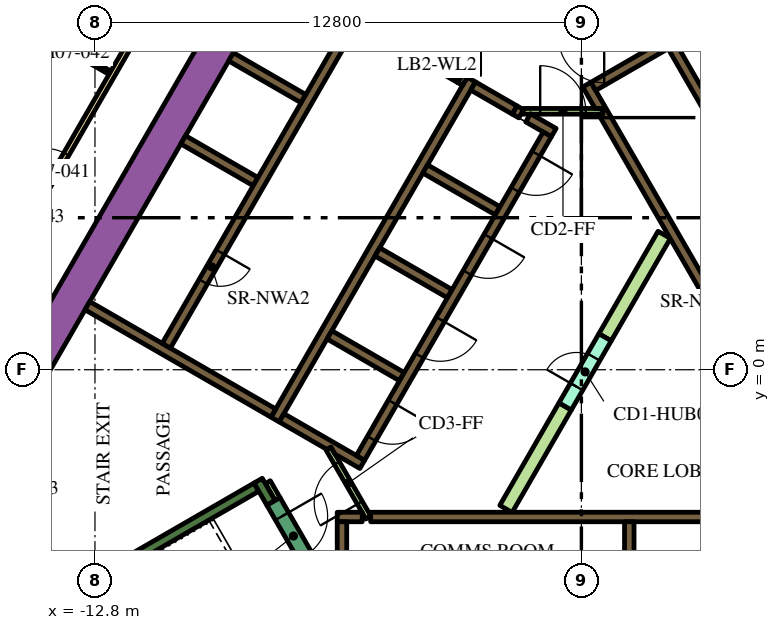
"""IFC4 building model, lengths in metres.
Left out: names, types, materials, properties, quantities, classifications, styles, units other than length and angle.
Written with IfcOpenShell. Run it as: python <this file> out.ifc"""

import sys

from ifc_helpers import new_model, si_unit, direction, frame, frame_2d, origin, place, context, subcontext, project, spatial, polyline, rectangle, outline, extrude, element, fill, save


model = new_model("IFC4")
c1 = context("Model", 3, precision=1e-05, world=origin(), true_north=direction((0.0, 1.0)))
c2 = subcontext(c1, "Body", "Model", "MODEL_VIEW")
j1 = project(units=[si_unit("LENGTHUNIT", "METRE"), si_unit("PLANEANGLEUNIT", "RADIAN")], contexts=[c1])
p1 = place(None, origin())
s1 = spatial("IfcSite", under=j1, at=p1, CompositionType="ELEMENT")
p2 = place(p1, origin())
s2 = spatial("IfcBuilding", under=s1, at=p2, CompositionType="ELEMENT")
p3 = place(p2, frame((0.0, 0.0, 103.2)))
s3 = spatial("IfcBuildingStorey", under=s2, at=p3, CompositionType="ELEMENT", Elevation=103.2)
p4 = place(p3, frame((-15.36, -1.503, 0.0), z_axis=(0.0, 0.0, 1.0), x_axis=(0.50000389221, 0.866023156604, 0.0)))
e1 = element("IfcWall", 1, at=p4, inside=s3, PredefinedType="SOLIDWALL", context=c2, shape_type="SweptSolid", body=[
    extrude(rectangle(XDim=21.0, YDim=0.9, at=frame_2d((10.5, 0.0))), origin(), (0.0, 0.0, 1.0), 3.9),
])
p5 = place(p3, frame((-12.134, -11.883, 0.0), z_axis=(0.0, 0.0, 1.0), x_axis=(-0.500005339912, 0.866022320763, 0.0)))
e2 = element("IfcWall", 2, at=p5, inside=s3, PredefinedType="SOLIDWALL", context=c2, shape_type="SweptSolid", body=[
    extrude(rectangle(XDim=9.488, YDim=0.9, at=frame_2d((4.744, 0.0))), origin(), (0.0, 0.0, 1.0), 3.9),
])
p6 = place(p3, frame((-14.44, -6.49, 0.0), z_axis=(0.0, 0.0, 1.0), x_axis=(0.866022966069, 0.500004222222, 0.0)))
e3 = element("IfcWall", 3, at=p6, inside=s3, PredefinedType="SOLIDWALL", context=c2, shape_type="SweptSolid", body=[
    extrude(rectangle(XDim=6.8, YDim=0.25, at=frame_2d((3.4, 0.0))), origin(), (0.0, 0.0, 1.0), 3.9),
])
p7 = place(p3, frame((-8.168, -3.503, 0.0), z_axis=(0.0, 0.0, 1.0), x_axis=(-0.499952099219, 0.866053057547, 0.0)))
e4 = element("IfcWall", 4, at=p7, inside=s3, PredefinedType="SOLIDWALL", context=c2, shape_type="SweptSolid", body=[
    extrude(rectangle(XDim=0.675, YDim=0.25, at=frame_2d((0.337, 0.0))), origin(), (0.0, 0.0, 1.0), 3.9),
])
p8 = place(p3, frame((-5.545, -3.875, 0.0), z_axis=(0.0, 0.0, 1.0), x_axis=(1.0, 0.0, 0.0)))
e5 = element("IfcWall", 5, at=p8, inside=s3, PredefinedType="SOLIDWALL", context=c2, shape_type="SweptSolid", body=[
    extrude(rectangle(XDim=11.97, YDim=0.25, at=frame_2d((5.985, 0.0))), origin(), (0.0, 0.0, 1.0), 3.9),
])
p9 = place(p3, frame((-6.425, -3.875, 0.0), z_axis=(0.0, 0.0, 1.0), x_axis=(1.0, 0.0, 0.0)))
e6 = element("IfcWall", 6, at=p9, inside=s3, PredefinedType="SOLIDWALL", context=c2, shape_type="SweptSolid", body=[
    extrude(rectangle(XDim=0.658, YDim=0.25, at=frame_2d((0.329, 0.0))), origin(), (0.0, 0.0, 1.0), 3.9),
])
p10 = place(p3, frame((1.26, -4.0, 0.0), z_axis=(0.0, 0.0, 1.0), x_axis=(0.0, -1.0, 0.0)))
e7 = element("IfcWall", 7, at=p10, inside=s3, PredefinedType="SOLIDWALL", context=c2, shape_type="SweptSolid", body=[
    extrude(rectangle(XDim=2.2, YDim=0.25, at=frame_2d((1.1, 0.0))), origin(), (0.0, 0.0, 1.0), 3.9),
])
p11 = place(p3, frame((-6.3, -4.0, 0.0), z_axis=(0.0, 0.0, 1.0), x_axis=(0.0, -1.0, 0.0)))
e8 = element("IfcWall", 8, at=p11, inside=s3, PredefinedType="SOLIDWALL", context=c2, shape_type="SweptSolid", body=[
    extrude(rectangle(XDim=3.154, YDim=0.25, at=frame_2d((1.577, 0.0))), origin(), (0.0, 0.0, 1.0), 3.9),
])
p12 = place(p3, origin())
e9 = element("IfcWall", 9, at=p12, inside=s3, PredefinedType="SOLIDWALL", context=c2, shape_type="SweptSolid", body=[
    extrude(outline(polyline([(0.566, 6.725), (0.566, 6.875), (0.566, 6.875), (0.565, 6.875), (0.361, 6.875), (0.035, 7.439), (0.252, 7.564), (0.377, 7.348), (6.552, -3.348), (6.677, -3.564), (6.46, -3.689), (0.448, 6.725), (0.565, 6.725), (0.566, 6.725), (0.566, 6.725)])), origin(), (0.0, 0.0, 1.0), 3.9),
])
p13 = place(p3, frame((0.314, 7.456, 0.0), z_axis=(0.0, 0.0, 1.0), x_axis=(0.866013897511, 0.50001992892, 0.0)))
e10 = element("IfcWall", 10, at=p13, inside=s3, PredefinedType="SOLIDWALL", context=c2, shape_type="SweptSolid", body=[
    extrude(rectangle(XDim=3.268, YDim=0.25, at=frame_2d((1.634, 0.0))), origin(), (0.0, 0.0, 1.0), 3.9),
])
p14 = place(p3, frame((-8.06, -1.311, 0.0), z_axis=(0.0, 0.0, 1.0), x_axis=(0.50000273126, 0.866023826885, 0.0)))
e11 = element("IfcWall", 11, at=p14, inside=s3, PredefinedType="SOLIDWALL", context=c2, shape_type="SweptSolid", body=[
    extrude(rectangle(XDim=10.33, YDim=0.25, at=frame_2d((5.165, 0.0))), origin(), (0.0, 0.0, 1.0), 3.9),
])
p15 = place(p3, frame((-1.758, 6.835, 0.0), z_axis=(0.0, 0.0, 1.0), x_axis=(0.865982457891, -0.500074377092, 0.0)))
e12 = element("IfcWall", 12, at=p15, inside=s3, PredefinedType="SOLIDWALL", context=c2, shape_type="SweptSolid", body=[
    extrude(rectangle(XDim=0.2, YDim=0.25, at=frame_2d((0.1, 0.0))), origin(), (0.0, 0.0, 1.0), 3.9),
])
p16 = place(p3, frame((-1.76, 6.836, 0.0), z_axis=(0.0, 0.0, 1.0), x_axis=(-0.865952863304, 0.500125622755, 0.0)))
e13 = element("IfcWall", 13, at=p16, inside=s3, PredefinedType="SOLIDWALL", context=c2, shape_type="SweptSolid", body=[
    extrude(rectangle(XDim=1.258, YDim=0.25, at=frame_2d((0.629, 0.0))), origin(), (0.0, 0.0, 1.0), 3.9),
])
p17 = place(p3, frame((-0.728, 6.24, 0.0), z_axis=(0.0, 0.0, 1.0), x_axis=(-0.865955664968, 0.500120771724, 0.0)))
e14 = element("IfcWall", 14, at=p17, inside=s3, PredefinedType="SOLIDWALL", context=c2, shape_type="SweptSolid", body=[
    extrude(rectangle(XDim=0.778, YDim=0.25, at=frame_2d((0.389, 0.0))), origin(), (0.0, 0.0, 1.0), 3.9),
])
for number, where, z_axis, x_axis in (
    (15, (-2.204, 4.182, 0.0), (0.0, 0.0, 1.0), (-0.866, 0.5, 0.0)),
    (16, (-5.369, 3.1, 0.0), (0.0, 0.0, 1.0), (0.866, -0.5, 0.0)),
    (17, (-4.724, -0.182, 0.0), (0.0, 0.0, 1.0), (-0.866, 0.5, 0.0)),
):
    element("IfcWall", number, at=place(p3, frame(where, z_axis=z_axis, x_axis=x_axis)), inside=s3, PredefinedType="SOLIDWALL", context=c2, shape_type="SweptSolid", body=[
        extrude(rectangle(XDim=2.2, YDim=0.25, at=frame_2d((1.1, 0.0))), origin(), (0.0, 0.0, 1.0), 3.9),
    ])
e18 = element("IfcWall", 18, at=p12, inside=s3, PredefinedType="SOLIDWALL", context=c2, shape_type="SweptSolid", body=[
    extrude(outline(polyline([(-5.922, -2.257), (-5.922, -2.257), (-5.705, -2.382), (-5.83, -2.598), (-6.483, -2.221), (-6.591, -2.033), (-6.591, -2.033), (-6.7, -2.096), (-7.952, -1.373), (-7.827, -1.156), (-5.922, -2.257)])), origin(), (0.0, 0.0, 1.0), 3.9),
])
p18 = place(p3, frame((-8.106, -1.14, 0.0), z_axis=(0.0, 0.0, 1.0), x_axis=(-0.866000643155, 0.500042884217, 0.0)))
e19 = element("IfcWall", 19, at=p18, inside=s3, PredefinedType="SOLIDWALL", context=c2, shape_type="SweptSolid", body=[
    extrude(rectangle(XDim=5.65, YDim=0.25, at=frame_2d((2.825, 0.0))), origin(), (0.0, 0.0, 1.0), 3.9),
])
e20 = element("IfcWall", 20, at=p12, inside=s3, PredefinedType="SOLIDWALL", context=c2, shape_type="SweptSolid", body=[
    extrude(outline(polyline([(-3.128, 7.481), (-3.259, 7.557), (-3.134, 7.773), (-3.003, 7.698), (-3.128, 7.481)])), origin(), (0.0, 0.0, 1.0), 3.9),
])
for number, where, z_axis, x_axis in (
    (21, (-8.574, 4.95, 0.0), (0.0, 0.0, 1.0), (-0.866, 0.5, 0.0)),
    (22, (-7.314, 7.132, 0.0), (0.0, 0.0, 1.0), (-0.866, 0.5, 0.0)),
):
    element("IfcWall", number, at=place(p3, frame(where, z_axis=z_axis, x_axis=x_axis)), inside=s3, PredefinedType="SOLIDWALL", context=c2, shape_type="SweptSolid", body=[
        extrude(rectangle(XDim=2.2, YDim=0.25, at=frame_2d((1.1, 0.0))), origin(), (0.0, 0.0, 1.0), 3.9),
    ])
p19 = place(p3, frame((-7.959, 10.415, 0.0), z_axis=(0.0, 0.0, 1.0), x_axis=(0.866020958405, -0.500007699544, 0.0)))
e23 = element("IfcWall", 23, at=p19, inside=s3, PredefinedType="SOLIDWALL", context=c2, shape_type="SweptSolid", body=[
    extrude(rectangle(XDim=4.1, YDim=0.25, at=frame_2d((2.05, 0.0))), origin(), (0.0, 0.0, 1.0), 3.9),
])
p20 = place(p3, frame((-8.252, -2.958, 0.0), z_axis=(0.0, 0.0, 1.0), x_axis=(0.500174715838, -0.865924508047, 0.0)))
e24 = element("IfcWall", 24, at=p20, inside=s3, PredefinedType="PARTITIONING", context=c2, shape_type="SweptSolid", body=[
    extrude(rectangle(XDim=0.514, YDim=0.15, at=frame_2d((0.257, 0.0))), origin(), (0.0, 0.0, 1.0), 2.75),
])
e25 = element("IfcWall", 25, at=p12, inside=s3, PredefinedType="PARTITIONING", context=c2, shape_type="SweptSolid", body=[
    extrude(outline(polyline([(-0.59, -0.872), (-0.265, -1.059), (-1.822, -3.756), (-2.147, -3.568), (-0.59, -0.872)])), origin(), (0.0, 0.0, 1.0), 2.75),
])
e26 = element("IfcWall", 26, at=p12, inside=s3, PredefinedType="PARTITIONING", context=c2, shape_type="SweptSolid", body=[
    extrude(outline(polyline([(2.017, 3.643), (2.342, 3.456), (0.785, 0.76), (0.46, 0.947), (2.017, 3.643)])), origin(), (0.0, 0.0, 1.0), 2.75),
])
p21 = place(p3, frame((8.565, -2.185, 0.0), z_axis=(0.0, 0.0, 1.0), x_axis=(-0.499997954832, 0.866026584559, 0.0)))
e27 = element("IfcWall", 27, at=p21, inside=s3, PredefinedType="SOLIDWALL", context=c2, shape_type="SweptSolid", body=[
    extrude(rectangle(XDim=12.35, YDim=0.25, at=frame_2d((6.175, 0.0))), origin(), (0.0, 0.0, 1.0), 3.9),
])
p22 = place(p21, frame((5.725, 0.0, 0.0)))
e28 = element("IfcOpeningElement", 28, at=p22, cuts=e27, PredefinedType="OPENING", context=c2, shape_type="SweptSolid", body=[
    extrude(rectangle(XDim=0.9, YDim=2.1, at=frame_2d((0.45, 1.05))), frame((0.0, 0.135, 0.0), z_axis=(0.0, -1.0, 0.0), x_axis=(1.0, 0.0, 0.0)), (0.0, 0.0, 1.0), 0.27),
])
p23 = place(p3, frame((-6.008, 9.144, 0.0), z_axis=(0.0, 0.0, 1.0), x_axis=(-0.500006956611, -0.866021387346, 0.0)))
e29 = element("IfcWall", 29, at=p23, inside=s3, PredefinedType="SOLIDWALL", context=c2, shape_type="SweptSolid", body=[
    extrude(rectangle(XDim=9.83, YDim=0.25, at=frame_2d((4.915, 0.0))), origin(), (0.0, 0.0, 1.0), 3.9),
])
p24 = place(p23, frame((6.985, 0.0, 0.0)))
e30 = element("IfcOpeningElement", 30, at=p24, cuts=e29, PredefinedType="OPENING", context=c2, shape_type="SweptSolid", body=[
    extrude(rectangle(XDim=0.9, YDim=2.1, at=frame_2d((0.45, 1.05))), frame((0.0, 0.135, 0.0), z_axis=(0.0, -1.0, 0.0), x_axis=(1.0, 0.0, 0.0)), (0.0, 0.0, 1.0), 0.27),
])
p25 = place(p3, frame((-0.898, 6.194, 0.0), z_axis=(0.0, 0.0, 1.0), x_axis=(-0.499996202215, -0.866027596426, 0.0)))
e31 = element("IfcWall", 31, at=p25, inside=s3, PredefinedType="SOLIDWALL", context=c2, shape_type="SweptSolid", body=[
    extrude(rectangle(XDim=9.83, YDim=0.25, at=frame_2d((4.915, 0.0))), origin(), (0.0, 0.0, 1.0), 3.9),
])
p26 = place(p25, frame((0.585, 0.0, 0.0)))
e32 = element("IfcOpeningElement", 32, at=p26, cuts=e31, PredefinedType="OPENING", context=c2, shape_type="SweptSolid", body=[
    extrude(rectangle(XDim=1.1, YDim=2.1, at=frame_2d((0.55, 1.05))), frame((0.0, 0.135, 0.0), z_axis=(0.0, -1.0, 0.0), x_axis=(1.0, 0.0, 0.0)), (0.0, 0.0, 1.0), 0.27),
])
p27 = place(p25, frame((3.105, 0.0, 0.0)))
e33 = element("IfcOpeningElement", 33, at=p27, cuts=e31, PredefinedType="OPENING", context=c2, shape_type="SweptSolid", body=[
    extrude(rectangle(XDim=1.1, YDim=2.1, at=frame_2d((0.55, 1.05))), frame((0.0, 0.135, 0.0), z_axis=(0.0, -1.0, 0.0), x_axis=(1.0, 0.0, 0.0)), (0.0, 0.0, 1.0), 0.27),
])
p28 = place(p25, frame((5.625, 0.0, 0.0)))
e34 = element("IfcOpeningElement", 34, at=p28, cuts=e31, PredefinedType="OPENING", context=c2, shape_type="SweptSolid", body=[
    extrude(rectangle(XDim=1.1, YDim=2.1, at=frame_2d((0.55, 1.05))), frame((0.0, 0.135, 0.0), z_axis=(0.0, -1.0, 0.0), x_axis=(1.0, 0.0, 0.0)), (0.0, 0.0, 1.0), 0.27),
])
p29 = place(p25, frame((8.145, 0.0, 0.0)))
e35 = element("IfcOpeningElement", 35, at=p29, cuts=e31, PredefinedType="OPENING", context=c2, shape_type="SweptSolid", body=[
    extrude(rectangle(XDim=1.1, YDim=2.1, at=frame_2d((0.55, 1.05))), frame((0.0, 0.135, 0.0), z_axis=(0.0, -1.0, 0.0), x_axis=(1.0, 0.0, 0.0)), (0.0, 0.0, 1.0), 0.27),
])
p30 = place(p3, frame((-8.103, -3.466, 0.0), z_axis=(0.0, 0.0, 1.0), x_axis=(0.500078061341, -0.865980330357, 0.0)))
e36 = element("IfcWall", 36, at=p30, inside=s3, PredefinedType="SOLIDWALL", context=c2, shape_type="SweptSolid", body=[
    extrude(rectangle(XDim=2.1, YDim=0.4, at=frame_2d((1.05, 0.0))), origin(), (0.0, 0.0, 1.0), 3.9),
])
p31 = place(p30, frame((0.45, 0.0, 0.0)))
e37 = element("IfcOpeningElement", 37, at=p31, cuts=e36, PredefinedType="OPENING", context=c2, shape_type="SweptSolid", body=[
    extrude(rectangle(XDim=1.2, YDim=2.1, at=frame_2d((0.6, 1.05))), frame((0.0, 0.21, 0.0), z_axis=(0.0, -1.0, 0.0), x_axis=(1.0, 0.0, 0.0)), (0.0, 0.0, 1.0), 0.42),
])
p32 = place(p3, frame((-0.427, -0.966, 0.0), z_axis=(0.0, 0.0, 1.0), x_axis=(0.49994051562, 0.866059744384, 0.0)))
e38 = element("IfcWall", 38, at=p32, inside=s3, PredefinedType="PARTITIONING", context=c2, shape_type="SweptSolid", body=[
    extrude(rectangle(XDim=2.1, YDim=0.375, at=frame_2d((1.05, 0.0))), origin(), (0.0, 0.0, 1.0), 2.75),
])
p33 = place(p32, frame((0.6, 0.0, 0.0)))
e39 = element("IfcOpeningElement", 39, at=p33, cuts=e38, PredefinedType="OPENING", context=c2, shape_type="SweptSolid", body=[
    extrude(rectangle(XDim=0.9, YDim=2.1, at=frame_2d((0.45, 1.05))), frame((0.0, 0.198, 0.0), z_axis=(0.0, -1.0, 0.0), x_axis=(1.0, 0.0, 0.0)), (0.0, 0.0, 1.0), 0.395),
])
p34 = place(p3, frame((-1.534, 6.8, 0.0), z_axis=(0.0, 0.0, 1.0), x_axis=(1.0, 0.0, 0.0)))
e40 = element("IfcWall", 40, at=p34, inside=s3, PredefinedType="PARTITIONING", context=c2, shape_type="SweptSolid", body=[
    extrude(rectangle(XDim=2.1, YDim=0.15, at=frame_2d((1.05, 0.0))), origin(), (0.0, 0.0, 1.0), 2.75),
])
p35 = place(p34, frame((0.45, 0.0, 0.0)))
e41 = element("IfcOpeningElement", 41, at=p35, cuts=e40, PredefinedType="OPENING", context=c2, shape_type="SweptSolid", body=[
    extrude(rectangle(XDim=1.2, YDim=2.1, at=frame_2d((0.6, 1.05))), frame((0.0, 0.085, 0.0), z_axis=(0.0, -1.0, 0.0), x_axis=(1.0, 0.0, 0.0)), (0.0, 0.0, 1.0), 0.17),
])
p36 = place(p3, frame((-5.606, -3.89, 0.0), z_axis=(0.0, 0.0, 1.0), x_axis=(-0.500027713859, 0.866009402589, 0.0)))
e42 = element("IfcWall", 42, at=p36, inside=s3, PredefinedType="PARTITIONING", context=c2, shape_type="SweptSolid", body=[
    extrude(rectangle(XDim=2.1, YDim=0.15, at=frame_2d((1.05, 0.0))), origin(), (0.0, 0.0, 1.0), 2.75),
])
p37 = place(p36, frame((0.45, 0.0, 0.0)))
e43 = element("IfcOpeningElement", 43, at=p37, cuts=e42, PredefinedType="OPENING", context=c2, shape_type="SweptSolid", body=[
    extrude(rectangle(XDim=1.2, YDim=2.1, at=frame_2d((0.6, 1.05))), frame((0.0, 0.085, 0.0), z_axis=(0.0, -1.0, 0.0), x_axis=(1.0, 0.0, 0.0)), (0.0, 0.0, 1.0), 0.17),
])
p38 = place(p3, frame((-4.409, 8.365, 0.0), z_axis=(0.0, 0.0, 1.0), x_axis=(0.866034573852, -0.49998411664, 0.0)))
e44 = element("IfcWall", 44, at=p38, inside=s3, PredefinedType="SOLIDWALL", context=c2, shape_type="SweptSolid", body=[
    extrude(rectangle(XDim=1.4, YDim=0.25, at=frame_2d((0.7, 0.0))), origin(), (0.0, 0.0, 1.0), 3.9),
])
p39 = place(p38, frame((0.1, 0.0, 0.0)))
e45 = element("IfcOpeningElement", 45, at=p39, cuts=e44, PredefinedType="OPENING", context=c2, shape_type="SweptSolid", body=[
    extrude(rectangle(XDim=1.2, YDim=2.1, at=frame_2d((0.6, 1.05))), frame((0.0, 0.135, 0.0), z_axis=(0.0, -1.0, 0.0), x_axis=(1.0, 0.0, 0.0)), (0.0, 0.0, 1.0), 0.27),
])
p40 = place(p3, frame((-19.081, -3.9, 0.0), z_axis=(0.0, 0.0, 1.0), x_axis=(0.499998313975, 0.866026377209, 0.0)))
e46 = element("IfcWall", 46, at=p40, inside=s3, PredefinedType="PARTITIONING", context=c2, shape_type="SweptSolid", body=[
    extrude(rectangle(XDim=25.766, YDim=0.15, at=frame_2d((12.883, 0.0))), origin(), (0.0, 0.0, 1.0), 2.75),
])
p41 = place(p40, frame((19.306, 0.0, 0.0)))
e47 = element("IfcOpeningElement", 47, at=p41, cuts=e46, PredefinedType="OPENING", context=c2, shape_type="SweptSolid", body=[
    extrude(rectangle(XDim=1.0, YDim=2.1, at=frame_2d((0.5, 1.05))), frame((0.0, 0.085, 0.0), z_axis=(0.0, -1.0, 0.0), x_axis=(1.0, 0.0, 0.0)), (0.0, 0.0, 1.0), 0.17),
])
p42 = place(p40, frame((17.144, 0.0, 0.0)))
e48 = element("IfcOpeningElement", 48, at=p42, cuts=e46, PredefinedType="OPENING", context=c2, shape_type="SweptSolid", body=[
    extrude(rectangle(XDim=0.9, YDim=2.1, at=frame_2d((0.45, 1.05))), frame((0.0, 0.085, 0.0), z_axis=(0.0, -1.0, 0.0), x_axis=(1.0, 0.0, 0.0)), (0.0, 0.0, 1.0), 0.17),
])
p43 = place(p40, frame((9.955, 0.0, 0.0)))
e49 = element("IfcOpeningElement", 49, at=p43, cuts=e46, PredefinedType="OPENING", context=c2, shape_type="SweptSolid", body=[
    extrude(rectangle(XDim=1.1, YDim=2.1, at=frame_2d((0.55, 1.05))), frame((0.0, 0.085, 0.0), z_axis=(0.0, -1.0, 0.0), x_axis=(1.0, 0.0, 0.0)), (0.0, 0.0, 1.0), 0.17),
])
p44 = place(p40, frame((8.648, 0.0, 0.0)))
e50 = element("IfcOpeningElement", 50, at=p44, cuts=e46, PredefinedType="OPENING", context=c2, shape_type="SweptSolid", body=[
    extrude(rectangle(XDim=1.0, YDim=2.1, at=frame_2d((0.5, 1.05))), frame((0.0, 0.085, 0.0), z_axis=(0.0, -1.0, 0.0), x_axis=(1.0, 0.0, 0.0)), (0.0, 0.0, 1.0), 0.17),
])
p45 = place(p40, frame((1.553, 0.0, 0.0)))
e51 = element("IfcOpeningElement", 51, at=p45, cuts=e46, PredefinedType="OPENING", context=c2, shape_type="SweptSolid", body=[
    extrude(rectangle(XDim=0.9, YDim=2.1, at=frame_2d((0.45, 1.05))), frame((0.0, 0.085, 0.0), z_axis=(0.0, -1.0, 0.0), x_axis=(1.0, 0.0, 0.0)), (0.0, 0.0, 1.0), 0.17),
])
p46 = place(p3, frame((-14.83, 9.213, 0.0), z_axis=(0.0, 0.0, 1.0), x_axis=(0.866034573852, -0.49998411664, 0.0)))
e52 = element("IfcWall", 52, at=p46, inside=s3, PredefinedType="PARTITIONING", context=c2, shape_type="SweptSolid", body=[
    extrude(rectangle(XDim=2.8, YDim=0.1, at=frame_2d((1.4, 0.0))), origin(), (0.0, 0.0, 1.0), 2.75),
])
p47 = place(p46, frame((1.25, 0.0, 0.0)))
e53 = element("IfcOpeningElement", 53, at=p47, cuts=e52, PredefinedType="OPENING", context=c2, shape_type="SweptSolid", body=[
    extrude(rectangle(XDim=1.0, YDim=2.1, at=frame_2d((0.5, 1.05))), frame((0.0, 0.06, 0.0), z_axis=(0.0, -1.0, 0.0), x_axis=(1.0, 0.0, 0.0)), (0.0, 0.0, 1.0), 0.12),
])
p48 = place(p24, origin())
e54 = element("IfcDoor", 54, at=p48, inside=s3, OperationType="SINGLE_SWING_LEFT", PredefinedType="DOOR", context=c2, shape_type="SweptSolid", body=[
    extrude(rectangle(XDim=0.9, YDim=2.1, at=frame_2d((0.45, 1.05))), frame((0.0, 0.025, 0.0), z_axis=(0.0, -1.0, 0.0), x_axis=(1.0, 0.0, 0.0)), (0.0, 0.0, 1.0), 0.05),
])
fill(e30, e54)
p49 = place(p26, origin())
e55 = element("IfcDoor", 55, at=p49, inside=s3, OperationType="DOUBLE_DOOR_SLIDING", PredefinedType="DOOR", context=c2, shape_type="SweptSolid", body=[
    extrude(rectangle(XDim=1.1, YDim=2.1, at=frame_2d((0.55, 1.05))), frame((0.0, 0.025, 0.0), z_axis=(0.0, -1.0, 0.0), x_axis=(1.0, 0.0, 0.0)), (0.0, 0.0, 1.0), 0.05),
])
fill(e32, e55)
p50 = place(p27, origin())
e56 = element("IfcDoor", 56, at=p50, inside=s3, OperationType="DOUBLE_DOOR_SLIDING", PredefinedType="DOOR", context=c2, shape_type="SweptSolid", body=[
    extrude(rectangle(XDim=1.1, YDim=2.1, at=frame_2d((0.55, 1.05))), frame((0.0, 0.025, 0.0), z_axis=(0.0, -1.0, 0.0), x_axis=(1.0, 0.0, 0.0)), (0.0, 0.0, 1.0), 0.05),
])
fill(e33, e56)
p51 = place(p28, origin())
e57 = element("IfcDoor", 57, at=p51, inside=s3, OperationType="DOUBLE_DOOR_SLIDING", PredefinedType="DOOR", context=c2, shape_type="SweptSolid", body=[
    extrude(rectangle(XDim=1.1, YDim=2.1, at=frame_2d((0.55, 1.05))), frame((0.0, 0.025, 0.0), z_axis=(0.0, -1.0, 0.0), x_axis=(1.0, 0.0, 0.0)), (0.0, 0.0, 1.0), 0.05),
])
fill(e34, e57)
p52 = place(p29, origin())
e58 = element("IfcDoor", 58, at=p52, inside=s3, OperationType="DOUBLE_DOOR_SLIDING", PredefinedType="DOOR", context=c2, shape_type="SweptSolid", body=[
    extrude(rectangle(XDim=1.1, YDim=2.1, at=frame_2d((0.55, 1.05))), frame((0.0, 0.025, 0.0), z_axis=(0.0, -1.0, 0.0), x_axis=(1.0, 0.0, 0.0)), (0.0, 0.0, 1.0), 0.05),
])
fill(e35, e58)
p53 = place(p31, origin())
e59 = element("IfcDoor", 59, at=p53, inside=s3, OperationType="SINGLE_SWING_LEFT", PredefinedType="DOOR", context=c2, shape_type="SweptSolid", body=[
    extrude(rectangle(XDim=1.2, YDim=2.1, at=frame_2d((0.6, 1.05))), frame((0.0, 0.025, 0.0), z_axis=(0.0, -1.0, 0.0), x_axis=(1.0, 0.0, 0.0)), (0.0, 0.0, 1.0), 0.05),
])
fill(e37, e59)
p54 = place(p33, origin())
e60 = element("IfcDoor", 60, at=p54, inside=s3, OperationType="SINGLE_SWING_LEFT", PredefinedType="DOOR", context=c2, shape_type="SweptSolid", body=[
    extrude(rectangle(XDim=0.9, YDim=2.1, at=frame_2d((0.45, 1.05))), frame((0.0, 0.025, 0.0), z_axis=(0.0, -1.0, 0.0), x_axis=(1.0, 0.0, 0.0)), (0.0, 0.0, 1.0), 0.05),
])
fill(e39, e60)
p55 = place(p35, origin())
e61 = element("IfcDoor", 61, at=p55, inside=s3, OperationType="SINGLE_SWING_LEFT", PredefinedType="DOOR", context=c2, shape_type="SweptSolid", body=[
    extrude(rectangle(XDim=1.2, YDim=2.1, at=frame_2d((0.6, 1.05))), frame((0.0, 0.025, 0.0), z_axis=(0.0, -1.0, 0.0), x_axis=(1.0, 0.0, 0.0)), (0.0, 0.0, 1.0), 0.05),
])
fill(e41, e61)
p56 = place(p37, origin())
e62 = element("IfcDoor", 62, at=p56, inside=s3, OperationType="SINGLE_SWING_LEFT", PredefinedType="DOOR", context=c2, shape_type="SweptSolid", body=[
    extrude(rectangle(XDim=1.2, YDim=2.1, at=frame_2d((0.6, 1.05))), frame((0.0, 0.025, 0.0), z_axis=(0.0, -1.0, 0.0), x_axis=(1.0, 0.0, 0.0)), (0.0, 0.0, 1.0), 0.05),
])
fill(e43, e62)
p57 = place(p39, origin())
e63 = element("IfcDoor", 63, at=p57, inside=s3, OperationType="SINGLE_SWING_LEFT", PredefinedType="DOOR", context=c2, shape_type="SweptSolid", body=[
    extrude(rectangle(XDim=1.2, YDim=2.1, at=frame_2d((0.6, 1.05))), frame((0.0, 0.025, 0.0), z_axis=(0.0, -1.0, 0.0), x_axis=(1.0, 0.0, 0.0)), (0.0, 0.0, 1.0), 0.05),
])
fill(e45, e63)
p58 = place(p43, origin())
e64 = element("IfcDoor", 64, at=p58, inside=s3, OperationType="SINGLE_SWING_LEFT", PredefinedType="DOOR", context=c2, shape_type="SweptSolid", body=[
    extrude(rectangle(XDim=1.1, YDim=2.1, at=frame_2d((0.55, 1.05))), frame((0.0, 0.025, 0.0), z_axis=(0.0, -1.0, 0.0), x_axis=(1.0, 0.0, 0.0)), (0.0, 0.0, 1.0), 0.05),
])
fill(e49, e64)
p59 = place(p47, origin())
e65 = element("IfcDoor", 65, at=p59, inside=s3, OperationType="SINGLE_SWING_LEFT", PredefinedType="DOOR", context=c2, shape_type="SweptSolid", body=[
    extrude(rectangle(XDim=1.0, YDim=2.1, at=frame_2d((0.5, 1.05))), frame((0.0, 0.025, 0.0), z_axis=(0.0, -1.0, 0.0), x_axis=(1.0, 0.0, 0.0)), (0.0, 0.0, 1.0), 0.05),
])
fill(e53, e65)
save(model, sys.argv[1])
